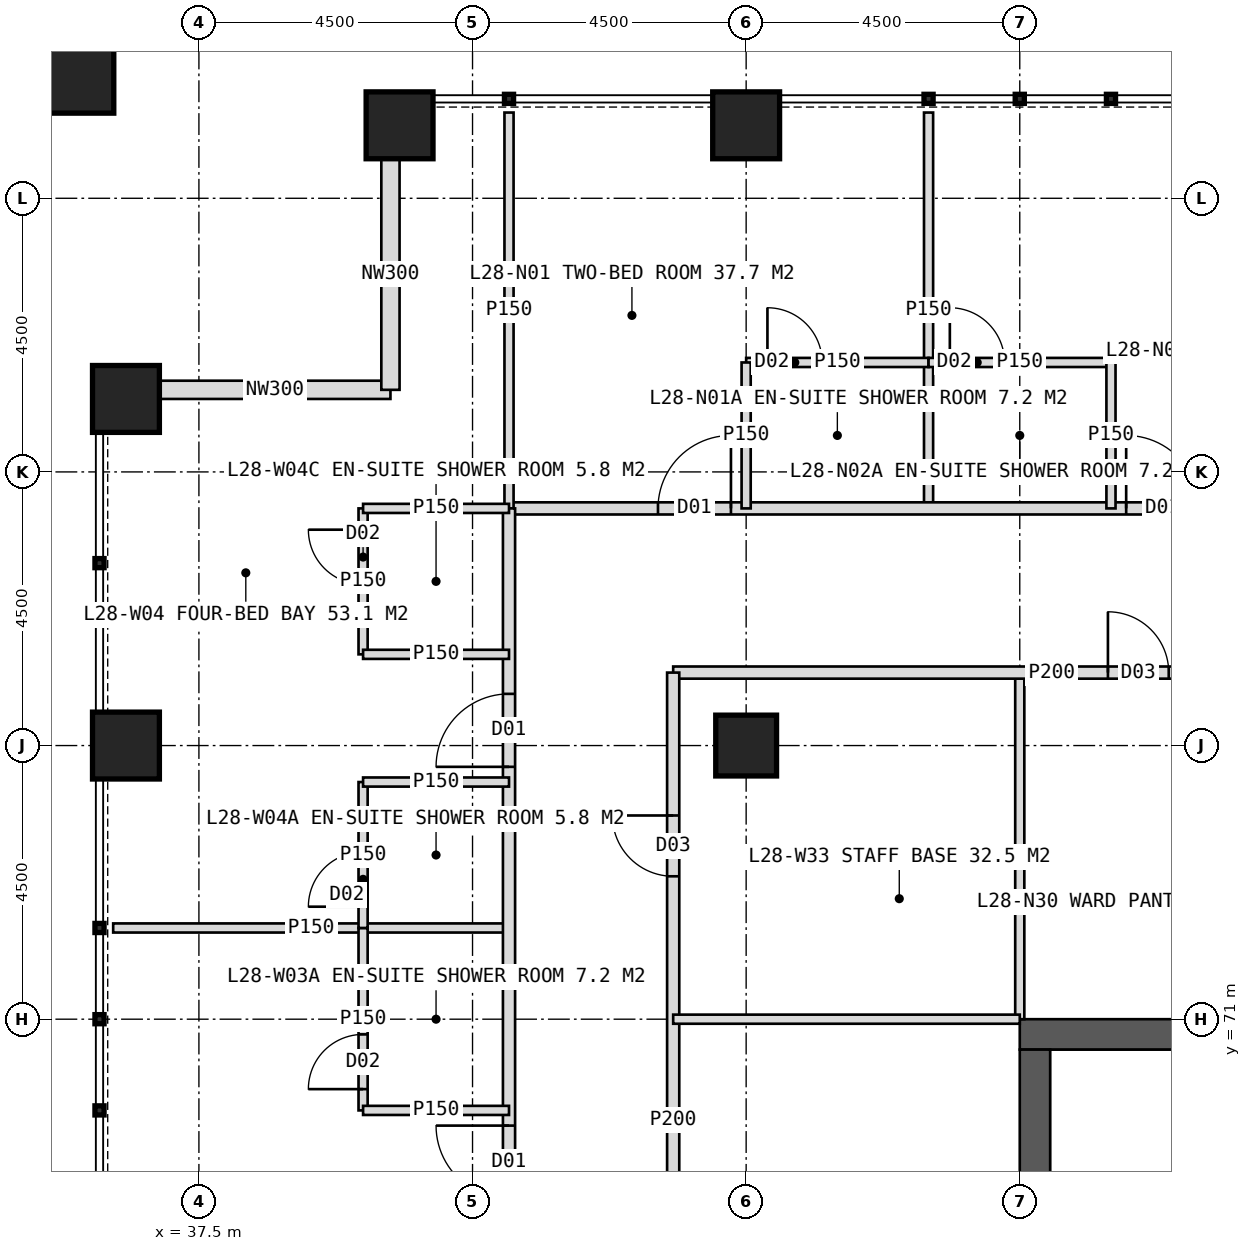
"""IFC4 building model, lengths in metres.
Left out: names, types, materials, properties, quantities, classifications, styles, units other than length and angle.
Written with IfcOpenShell. Run it as: python <this file> out.ifc"""

import sys

from ifc_helpers import new_model, si_unit, direction, frame, frame_2d, origin, origin_2d, place, context, subcontext, project, spatial, rectangle, hollow_rectangle, extrude, element, fill, save


model = new_model("IFC4")
c1 = context("Model", 3, precision=1e-05, world=origin(), true_north=direction((0.0, 1.0)))
c2 = subcontext(c1, "Body", "Model", "MODEL_VIEW")
j1 = project(units=[si_unit("LENGTHUNIT", "METRE"), si_unit("PLANEANGLEUNIT", "RADIAN")], contexts=[c1])
p1 = place(None, origin())
s1 = spatial("IfcSite", under=j1, at=p1, CompositionType="ELEMENT")
p2 = place(p1, origin())
s2 = spatial("IfcBuilding", under=s1, at=p2, CompositionType="ELEMENT")
p3 = place(p2, frame((0.0, 0.0, 120.0)))
s3 = spatial("IfcBuildingStorey", under=s2, at=p3, CompositionType="ELEMENT", Elevation=120.0)
p4 = place(p3, frame((51.0, 70.75, 0.0), z_axis=(0.0, 0.0, 1.0), x_axis=(1.0, 0.0, 0.0)))
e1 = element("IfcWall", 1, at=p4, inside=s3, PredefinedType="SHEAR", context=c2, shape_type="SweptSolid", body=[
    extrude(rectangle(XDim=18.0, YDim=0.5, at=frame_2d((9.0, 0.0))), origin(), (0.0, 0.0, 1.0), 4.0),
])
p5 = place(p4, frame((8.1, 0.0, 0.0)))
e2 = element("IfcOpeningElement", 2, at=p5, cuts=e1, PredefinedType="OPENING", context=c2, shape_type="SweptSolid", body=[
    extrude(rectangle(XDim=1.8, YDim=2.2, at=frame_2d((0.9, 1.1))), frame((0.0, 0.26, 0.0), z_axis=(0.0, -1.0, 0.0), x_axis=(1.0, 0.0, 0.0)), (0.0, 0.0, 1.0), 0.52),
])
p6 = place(p3, frame((51.25, 53.5, 0.0), z_axis=(0.0, 0.0, 1.0), x_axis=(0.0, 1.0, 0.0)))
e3 = element("IfcWall", 3, at=p6, inside=s3, PredefinedType="SHEAR", context=c2, shape_type="SweptSolid", body=[
    extrude(rectangle(XDim=17.0, YDim=0.5, at=frame_2d((8.5, 0.0))), origin(), (0.0, 0.0, 1.0), 4.0),
])
p7 = place(p6, frame((6.0, 0.0, 0.0)))
e4 = element("IfcOpeningElement", 4, at=p7, cuts=e3, PredefinedType="OPENING", context=c2, shape_type="SweptSolid", body=[
    extrude(rectangle(XDim=1.5, YDim=2.2, at=frame_2d((0.75, 1.1))), frame((0.0, 0.26, 0.0), z_axis=(0.0, -1.0, 0.0), x_axis=(1.0, 0.0, 0.0)), (0.0, 0.0, 1.0), 0.52),
])
p8 = place(p3, frame((46.5, 75.5, 0.0), z_axis=(0.0, 0.0, 1.0), x_axis=(1.0, 0.0, 0.0)))
e5 = element("IfcColumn", 5, at=p8, inside=s3, PredefinedType="COLUMN", context=c2, shape_type="SweptSolid", body=[
    extrude(hollow_rectangle(XDim=1.0, YDim=1.0, WallThickness=0.1, at=origin_2d()), origin(), (0.0, 0.0, 1.0), 4.0),
])
for number, where, z_axis, x_axis in (
    (6, (40.8, 85.7, 0.0), (0.0, 0.0, 1.0), (1.0, 0.0, 0.0)),
    (7, (46.5, 85.7, 0.0), (0.0, 0.0, 1.0), (1.0, 0.0, 0.0)),
    (8, (36.3, 75.5, 0.0), (0.0, 0.0, 1.0), (1.0, 0.0, 0.0)),
    (9, (36.3, 81.2, 0.0), (0.0, 0.0, 1.0), (1.0, 0.0, 0.0)),
):
    element("IfcColumn", number, at=place(p3, frame(where, z_axis=z_axis, x_axis=x_axis)), inside=s3, PredefinedType="COLUMN", context=c2, shape_type="SweptSolid", body=[
        extrude(hollow_rectangle(XDim=1.1, YDim=1.1, WallThickness=0.1, at=origin_2d()), origin(), (0.0, 0.0, 1.0), 4.0),
    ])
p9 = place(p3, frame((35.4, 86.6, 0.0), z_axis=(0.0, 0.0, 1.0), x_axis=(1.0, 0.0, 0.0)))
e10 = element("IfcColumn", 10, at=p9, inside=s3, PredefinedType="COLUMN", context=c2, shape_type="SweptSolid", body=[
    extrude(hollow_rectangle(XDim=1.4, YDim=1.4, WallThickness=0.08, at=origin_2d()), origin(), (0.0, 0.0, 1.0), 4.0),
])
for number, where, z_axis, x_axis in (
    (11, (36.85, 81.35, 0.0), (0.0, 0.0, 1.0), (1.0, 0.0, 0.0)),
    (12, (40.65, 81.35, 0.0), (0.0, 0.0, 1.0), (0.0, 1.0, 0.0)),
):
    element("IfcWall", number, at=place(p3, frame(where, z_axis=z_axis, x_axis=x_axis)), inside=s3, PredefinedType="ELEMENTEDWALL", context=c2, shape_type="SweptSolid", body=[
        extrude(rectangle(XDim=3.8, YDim=0.3, at=frame_2d((1.9, 0.0))), origin(), (0.0, 0.0, 1.0), 4.0),
    ])
p10 = place(p3, frame((49.5, 79.4, 0.0), z_axis=(0.0, 0.0, 1.0), x_axis=(0.0, 1.0, 0.0)))
e13 = element("IfcWall", 13, at=p10, inside=s3, PredefinedType="PARTITIONING", context=c2, shape_type="SweptSolid", body=[
    extrude(rectangle(XDim=6.51, YDim=0.15, at=frame_2d((3.255, 0.0))), origin(), (0.0, 0.0, 1.0), 3.75),
])
p11 = place(p3, frame((42.6, 79.4, 0.0), z_axis=(0.0, 0.0, 1.0), x_axis=(1.0, 0.0, 0.0)))
e14 = element("IfcWall", 14, at=p11, inside=s3, PredefinedType="PARTITIONING", context=c2, shape_type="SweptSolid", body=[
    extrude(rectangle(XDim=34.8, YDim=0.2, at=frame_2d((17.4, 0.0))), origin(), (0.0, 0.0, 1.0), 3.75),
])
p12 = place(p11, frame((2.45, 0.0, 0.0)))
e15 = element("IfcOpeningElement", 15, at=p12, cuts=e14, PredefinedType="OPENING", context=c2, shape_type="SweptSolid", body=[
    extrude(rectangle(XDim=1.2, YDim=2.2, at=frame_2d((0.6, 1.1))), frame((0.0, 0.11, 0.0), z_axis=(0.0, -1.0, 0.0), x_axis=(1.0, 0.0, 0.0)), (0.0, 0.0, 1.0), 0.22),
])
p13 = place(p11, frame((10.15, 0.0, 0.0)))
e16 = element("IfcOpeningElement", 16, at=p13, cuts=e14, PredefinedType="OPENING", context=c2, shape_type="SweptSolid", body=[
    extrude(rectangle(XDim=1.2, YDim=2.2, at=frame_2d((0.6, 1.1))), frame((0.0, 0.11, 0.0), z_axis=(0.0, -1.0, 0.0), x_axis=(1.0, 0.0, 0.0)), (0.0, 0.0, 1.0), 0.22),
])
p14 = place(p11, frame((19.8, 0.0, 0.0)))
e17 = element("IfcOpeningElement", 17, at=p14, cuts=e14, PredefinedType="OPENING", context=c2, shape_type="SweptSolid", body=[
    extrude(rectangle(XDim=1.2, YDim=2.2, at=frame_2d((0.6, 1.1))), frame((0.0, 0.11, 0.0), z_axis=(0.0, -1.0, 0.0), x_axis=(1.0, 0.0, 0.0)), (0.0, 0.0, 1.0), 0.22),
])
p15 = place(p11, frame((27.55, 0.0, 0.0)))
e18 = element("IfcOpeningElement", 18, at=p15, cuts=e14, PredefinedType="OPENING", context=c2, shape_type="SweptSolid", body=[
    extrude(rectangle(XDim=1.2, YDim=2.2, at=frame_2d((0.6, 1.1))), frame((0.0, 0.11, 0.0), z_axis=(0.0, -1.0, 0.0), x_axis=(1.0, 0.0, 0.0)), (0.0, 0.0, 1.0), 0.22),
])
p16 = place(p3, frame((42.6, 79.4, 0.0), z_axis=(0.0, 0.0, 1.0), x_axis=(0.0, 1.0, 0.0)))
e19 = element("IfcWall", 19, at=p16, inside=s3, PredefinedType="PARTITIONING", context=c2, shape_type="SweptSolid", body=[
    extrude(rectangle(XDim=6.51, YDim=0.15, at=frame_2d((3.255, 0.0))), origin(), (0.0, 0.0, 1.0), 3.75),
])
p17 = place(p3, frame((46.5, 81.8, 0.0), z_axis=(0.0, 0.0, 1.0), x_axis=(1.0, 0.0, 0.0)))
e20 = element("IfcWall", 20, at=p17, inside=s3, PredefinedType="PARTITIONING", context=c2, shape_type="SweptSolid", body=[
    extrude(rectangle(XDim=3.0, YDim=0.15, at=frame_2d((1.5, 0.0))), origin(), (0.0, 0.0, 1.0), 3.75),
])
p18 = place(p17, frame((0.35, 0.0, 0.0)))
e21 = element("IfcOpeningElement", 21, at=p18, cuts=e20, PredefinedType="OPENING", context=c2, shape_type="SweptSolid", body=[
    extrude(rectangle(XDim=0.9, YDim=2.1, at=frame_2d((0.45, 1.05))), frame((0.0, 0.085, 0.0), z_axis=(0.0, -1.0, 0.0), x_axis=(1.0, 0.0, 0.0)), (0.0, 0.0, 1.0), 0.17),
])
p19 = place(p3, frame((46.5, 79.4, 0.0), z_axis=(0.0, 0.0, 1.0), x_axis=(0.0, 1.0, 0.0)))
e22 = element("IfcWall", 22, at=p19, inside=s3, PredefinedType="PARTITIONING", context=c2, shape_type="SweptSolid", body=[
    extrude(rectangle(XDim=2.4, YDim=0.15, at=frame_2d((1.2, 0.0))), origin(), (0.0, 0.0, 1.0), 2.95),
])
p20 = place(p3, frame((49.5, 81.8, 0.0), z_axis=(0.0, 0.0, 1.0), x_axis=(1.0, 0.0, 0.0)))
e23 = element("IfcWall", 23, at=p20, inside=s3, PredefinedType="PARTITIONING", context=c2, shape_type="SweptSolid", body=[
    extrude(rectangle(XDim=3.0, YDim=0.15, at=frame_2d((1.5, 0.0))), origin(), (0.0, 0.0, 1.0), 3.75),
])
p21 = place(p20, frame((0.35, 0.0, 0.0)))
e24 = element("IfcOpeningElement", 24, at=p21, cuts=e23, PredefinedType="OPENING", context=c2, shape_type="SweptSolid", body=[
    extrude(rectangle(XDim=0.9, YDim=2.1, at=frame_2d((0.45, 1.05))), frame((0.0, 0.085, 0.0), z_axis=(0.0, -1.0, 0.0), x_axis=(1.0, 0.0, 0.0)), (0.0, 0.0, 1.0), 0.17),
])
p22 = place(p3, frame((52.5, 79.4, 0.0), z_axis=(0.0, 0.0, 1.0), x_axis=(0.0, 1.0, 0.0)))
e25 = element("IfcWall", 25, at=p22, inside=s3, PredefinedType="PARTITIONING", context=c2, shape_type="SweptSolid", body=[
    extrude(rectangle(XDim=2.4, YDim=0.15, at=frame_2d((1.2, 0.0))), origin(), (0.0, 0.0, 1.0), 3.75),
])
p23 = place(p3, frame((51.0, 71.0, 0.0), z_axis=(0.0, 0.0, 1.0), x_axis=(0.0, 1.0, 0.0)))
e26 = element("IfcWall", 26, at=p23, inside=s3, PredefinedType="PARTITIONING", context=c2, shape_type="SweptSolid", body=[
    extrude(rectangle(XDim=5.7, YDim=0.15, at=frame_2d((2.85, 0.0))), origin(), (0.0, 0.0, 1.0), 3.75),
])
p24 = place(p3, frame((45.3, 76.7, 0.0), z_axis=(0.0, 0.0, 1.0), x_axis=(1.0, 0.0, 0.0)))
e27 = element("IfcWall", 27, at=p24, inside=s3, PredefinedType="PARTITIONING", context=c2, shape_type="SweptSolid", body=[
    extrude(rectangle(XDim=12.45, YDim=0.2, at=frame_2d((6.225, 0.0))), origin(), (0.0, 0.0, 1.0), 3.75),
])
p25 = place(p24, frame((7.15, 0.0, 0.0)))
e28 = element("IfcOpeningElement", 28, at=p25, cuts=e27, PredefinedType="OPENING", context=c2, shape_type="SweptSolid", body=[
    extrude(rectangle(XDim=1.0, YDim=2.1, at=frame_2d((0.5, 1.05))), frame((0.0, 0.11, 0.0), z_axis=(0.0, -1.0, 0.0), x_axis=(1.0, 0.0, 0.0)), (0.0, 0.0, 1.0), 0.22),
])
p26 = place(p3, frame((42.6, 72.5, 0.0), z_axis=(0.0, 0.0, 1.0), x_axis=(-1.0, 0.0, 0.0)))
e29 = element("IfcWall", 29, at=p26, inside=s3, PredefinedType="PARTITIONING", context=c2, shape_type="SweptSolid", body=[
    extrude(rectangle(XDim=6.51, YDim=0.15, at=frame_2d((3.255, 0.0))), origin(), (0.0, 0.0, 1.0), 3.75),
])
p27 = place(p3, frame((42.6, 44.6, 0.0), z_axis=(0.0, 0.0, 1.0), x_axis=(0.0, 1.0, 0.0)))
e30 = element("IfcWall", 30, at=p27, inside=s3, PredefinedType="PARTITIONING", context=c2, shape_type="SweptSolid", body=[
    extrude(rectangle(XDim=34.8, YDim=0.2, at=frame_2d((17.4, 0.0))), origin(), (0.0, 0.0, 1.0), 3.75),
])
p28 = place(p27, frame((2.45, 0.0, 0.0)))
e31 = element("IfcOpeningElement", 31, at=p28, cuts=e30, PredefinedType="OPENING", context=c2, shape_type="SweptSolid", body=[
    extrude(rectangle(XDim=1.2, YDim=2.2, at=frame_2d((0.6, 1.1))), frame((0.0, 0.11, 0.0), z_axis=(0.0, -1.0, 0.0), x_axis=(1.0, 0.0, 0.0)), (0.0, 0.0, 1.0), 0.22),
])
p29 = place(p27, frame((10.15, 0.0, 0.0)))
e32 = element("IfcOpeningElement", 32, at=p29, cuts=e30, PredefinedType="OPENING", context=c2, shape_type="SweptSolid", body=[
    extrude(rectangle(XDim=1.2, YDim=2.2, at=frame_2d((0.6, 1.1))), frame((0.0, 0.11, 0.0), z_axis=(0.0, -1.0, 0.0), x_axis=(1.0, 0.0, 0.0)), (0.0, 0.0, 1.0), 0.22),
])
p30 = place(p27, frame((23.45, 0.0, 0.0)))
e33 = element("IfcOpeningElement", 33, at=p30, cuts=e30, PredefinedType="OPENING", context=c2, shape_type="SweptSolid", body=[
    extrude(rectangle(XDim=1.2, YDim=2.2, at=frame_2d((0.6, 1.1))), frame((0.0, 0.11, 0.0), z_axis=(0.0, -1.0, 0.0), x_axis=(1.0, 0.0, 0.0)), (0.0, 0.0, 1.0), 0.22),
])
p31 = place(p27, frame((30.55, 0.0, 0.0)))
e34 = element("IfcOpeningElement", 34, at=p31, cuts=e30, PredefinedType="OPENING", context=c2, shape_type="SweptSolid", body=[
    extrude(rectangle(XDim=1.2, YDim=2.2, at=frame_2d((0.6, 1.1))), frame((0.0, 0.11, 0.0), z_axis=(0.0, -1.0, 0.0), x_axis=(1.0, 0.0, 0.0)), (0.0, 0.0, 1.0), 0.22),
])
p32 = place(p3, frame((40.2, 69.5, 0.0), z_axis=(0.0, 0.0, 1.0), x_axis=(0.0, 1.0, 0.0)))
e35 = element("IfcWall", 35, at=p32, inside=s3, PredefinedType="PARTITIONING", context=c2, shape_type="SweptSolid", body=[
    extrude(rectangle(XDim=3.0, YDim=0.15, at=frame_2d((1.5, 0.0))), origin(), (0.0, 0.0, 1.0), 3.75),
])
p33 = place(p32, frame((0.35, 0.0, 0.0)))
e36 = element("IfcOpeningElement", 36, at=p33, cuts=e35, PredefinedType="OPENING", context=c2, shape_type="SweptSolid", body=[
    extrude(rectangle(XDim=0.9, YDim=2.1, at=frame_2d((0.45, 1.05))), frame((0.0, 0.085, 0.0), z_axis=(0.0, -1.0, 0.0), x_axis=(1.0, 0.0, 0.0)), (0.0, 0.0, 1.0), 0.17),
])
p34 = place(p3, frame((42.6, 69.5, 0.0), z_axis=(0.0, 0.0, 1.0), x_axis=(-1.0, 0.0, 0.0)))
e37 = element("IfcWall", 37, at=p34, inside=s3, PredefinedType="PARTITIONING", context=c2, shape_type="SweptSolid", body=[
    extrude(rectangle(XDim=2.4, YDim=0.15, at=frame_2d((1.2, 0.0))), origin(), (0.0, 0.0, 1.0), 3.75),
])
p35 = place(p3, frame((40.2, 72.5, 0.0), z_axis=(0.0, 0.0, 1.0), x_axis=(0.0, 1.0, 0.0)))
e38 = element("IfcWall", 38, at=p35, inside=s3, PredefinedType="PARTITIONING", context=c2, shape_type="SweptSolid", body=[
    extrude(rectangle(XDim=2.4, YDim=0.15, at=frame_2d((1.2, 0.0))), origin(), (0.0, 0.0, 1.0), 3.75),
])
p36 = place(p35, frame((0.35, 0.0, 0.0)))
e39 = element("IfcOpeningElement", 39, at=p36, cuts=e38, PredefinedType="OPENING", context=c2, shape_type="SweptSolid", body=[
    extrude(rectangle(XDim=0.9, YDim=2.1, at=frame_2d((0.45, 1.05))), frame((0.0, 0.085, 0.0), z_axis=(0.0, -1.0, 0.0), x_axis=(1.0, 0.0, 0.0)), (0.0, 0.0, 1.0), 0.17),
])
p37 = place(p3, frame((42.6, 74.9, 0.0), z_axis=(0.0, 0.0, 1.0), x_axis=(-1.0, 0.0, 0.0)))
e40 = element("IfcWall", 40, at=p37, inside=s3, PredefinedType="PARTITIONING", context=c2, shape_type="SweptSolid", body=[
    extrude(rectangle(XDim=2.4, YDim=0.15, at=frame_2d((1.2, 0.0))), origin(), (0.0, 0.0, 1.0), 3.75),
])
p38 = place(p3, frame((40.2, 77.0, 0.0), z_axis=(0.0, 0.0, 1.0), x_axis=(0.0, 1.0, 0.0)))
e41 = element("IfcWall", 41, at=p38, inside=s3, PredefinedType="PARTITIONING", context=c2, shape_type="SweptSolid", body=[
    extrude(rectangle(XDim=2.4, YDim=0.15, at=frame_2d((1.2, 0.0))), origin(), (0.0, 0.0, 1.0), 3.75),
])
p39 = place(p38, frame((1.15, 0.0, 0.0)))
e42 = element("IfcOpeningElement", 42, at=p39, cuts=e41, PredefinedType="OPENING", context=c2, shape_type="SweptSolid", body=[
    extrude(rectangle(XDim=0.9, YDim=2.1, at=frame_2d((0.45, 1.05))), frame((0.0, 0.085, 0.0), z_axis=(0.0, -1.0, 0.0), x_axis=(1.0, 0.0, 0.0)), (0.0, 0.0, 1.0), 0.17),
])
for number, where, z_axis, x_axis in (
    (43, (42.6, 77.0, 0.0), (0.0, 0.0, 1.0), (-1.0, 0.0, 0.0)),
    (44, (42.6, 79.4, 0.0), (0.0, 0.0, 1.0), (-1.0, 0.0, 0.0)),
):
    element("IfcWall", number, at=place(p3, frame(where, z_axis=z_axis, x_axis=x_axis)), inside=s3, PredefinedType="PARTITIONING", context=c2, shape_type="SweptSolid", body=[
        extrude(rectangle(XDim=2.4, YDim=0.15, at=frame_2d((1.2, 0.0))), origin(), (0.0, 0.0, 1.0), 3.75),
    ])
p40 = place(p3, frame((45.3, 62.0, 0.0), z_axis=(0.0, 0.0, 1.0), x_axis=(0.0, 1.0, 0.0)))
e45 = element("IfcWall", 45, at=p40, inside=s3, PredefinedType="PARTITIONING", context=c2, shape_type="SweptSolid", body=[
    extrude(rectangle(XDim=14.7, YDim=0.2, at=frame_2d((7.35, 0.0))), origin(), (0.0, 0.0, 1.0), 3.75),
])
p41 = place(p40, frame((1.45, 0.0, 0.0)))
e46 = element("IfcOpeningElement", 46, at=p41, cuts=e45, PredefinedType="OPENING", context=c2, shape_type="SweptSolid", body=[
    extrude(rectangle(XDim=1.0, YDim=2.1, at=frame_2d((0.5, 1.05))), frame((0.0, 0.11, 0.0), z_axis=(0.0, -1.0, 0.0), x_axis=(1.0, 0.0, 0.0)), (0.0, 0.0, 1.0), 0.22),
])
p42 = place(p40, frame((11.35, 0.0, 0.0)))
e47 = element("IfcOpeningElement", 47, at=p42, cuts=e45, PredefinedType="OPENING", context=c2, shape_type="SweptSolid", body=[
    extrude(rectangle(XDim=1.0, YDim=2.1, at=frame_2d((0.5, 1.05))), frame((0.0, 0.11, 0.0), z_axis=(0.0, -1.0, 0.0), x_axis=(1.0, 0.0, 0.0)), (0.0, 0.0, 1.0), 0.22),
])
p43 = place(p3, frame((51.0, 71.0, 0.0), z_axis=(0.0, 0.0, 1.0), x_axis=(-1.0, 0.0, 0.0)))
e48 = element("IfcWall", 48, at=p43, inside=s3, PredefinedType="PARTITIONING", context=c2, shape_type="SweptSolid", body=[
    extrude(rectangle(XDim=5.7, YDim=0.15, at=frame_2d((2.85, 0.0))), origin(), (0.0, 0.0, 1.0), 3.75),
])
p44 = place(p12, origin())
e49 = element("IfcDoor", 49, at=p44, inside=s3, OperationType="SINGLE_SWING_RIGHT", PredefinedType="DOOR", context=c2, shape_type="SweptSolid", body=[
    extrude(rectangle(XDim=1.2, YDim=2.2, at=frame_2d((0.6, 1.1))), frame((0.0, 0.025, 0.0), z_axis=(0.0, -1.0, 0.0), x_axis=(1.0, 0.0, 0.0)), (0.0, 0.0, 1.0), 0.05),
])
fill(e15, e49)
p45 = place(p18, origin())
e50 = element("IfcDoor", 50, at=p45, inside=s3, OperationType="SINGLE_SWING_LEFT", PredefinedType="DOOR", context=c2, shape_type="SweptSolid", body=[
    extrude(rectangle(XDim=0.9, YDim=2.1, at=frame_2d((0.45, 1.05))), frame((0.0, 0.025, 0.0), z_axis=(0.0, -1.0, 0.0), x_axis=(1.0, 0.0, 0.0)), (0.0, 0.0, 1.0), 0.05),
])
fill(e21, e50)
p46 = place(p13, origin())
e51 = element("IfcDoor", 51, at=p46, inside=s3, OperationType="SINGLE_SWING_LEFT", PredefinedType="DOOR", context=c2, shape_type="SweptSolid", body=[
    extrude(rectangle(XDim=1.2, YDim=2.2, at=frame_2d((0.6, 1.1))), frame((0.0, 0.025, 0.0), z_axis=(0.0, -1.0, 0.0), x_axis=(1.0, 0.0, 0.0)), (0.0, 0.0, 1.0), 0.05),
])
fill(e16, e51)
p47 = place(p21, origin())
e52 = element("IfcDoor", 52, at=p47, inside=s3, OperationType="SINGLE_SWING_LEFT", PredefinedType="DOOR", context=c2, shape_type="SweptSolid", body=[
    extrude(rectangle(XDim=0.9, YDim=2.1, at=frame_2d((0.45, 1.05))), frame((0.0, 0.025, 0.0), z_axis=(0.0, -1.0, 0.0), x_axis=(1.0, 0.0, 0.0)), (0.0, 0.0, 1.0), 0.05),
])
fill(e24, e52)
p48 = place(p25, origin())
e53 = element("IfcDoor", 53, at=p48, inside=s3, OperationType="SINGLE_SWING_LEFT", PredefinedType="DOOR", context=c2, shape_type="SweptSolid", body=[
    extrude(rectangle(XDim=1.0, YDim=2.1, at=frame_2d((0.5, 1.05))), frame((0.0, 0.025, 0.0), z_axis=(0.0, -1.0, 0.0), x_axis=(1.0, 0.0, 0.0)), (0.0, 0.0, 1.0), 0.05),
])
fill(e28, e53)
p49 = place(p30, origin())
e54 = element("IfcDoor", 54, at=p49, inside=s3, OperationType="SINGLE_SWING_RIGHT", PredefinedType="DOOR", context=c2, shape_type="SweptSolid", body=[
    extrude(rectangle(XDim=1.2, YDim=2.2, at=frame_2d((0.6, 1.1))), frame((0.0, 0.025, 0.0), z_axis=(0.0, -1.0, 0.0), x_axis=(1.0, 0.0, 0.0)), (0.0, 0.0, 1.0), 0.05),
])
fill(e33, e54)
p50 = place(p33, origin())
e55 = element("IfcDoor", 55, at=p50, inside=s3, OperationType="SINGLE_SWING_LEFT", PredefinedType="DOOR", context=c2, shape_type="SweptSolid", body=[
    extrude(rectangle(XDim=0.9, YDim=2.1, at=frame_2d((0.45, 1.05))), frame((0.0, 0.025, 0.0), z_axis=(0.0, -1.0, 0.0), x_axis=(1.0, 0.0, 0.0)), (0.0, 0.0, 1.0), 0.05),
])
fill(e36, e55)
p51 = place(p31, origin())
e56 = element("IfcDoor", 56, at=p51, inside=s3, OperationType="SINGLE_SWING_LEFT", PredefinedType="DOOR", context=c2, shape_type="SweptSolid", body=[
    extrude(rectangle(XDim=1.2, YDim=2.2, at=frame_2d((0.6, 1.1))), frame((0.0, 0.025, 0.0), z_axis=(0.0, -1.0, 0.0), x_axis=(1.0, 0.0, 0.0)), (0.0, 0.0, 1.0), 0.05),
])
fill(e34, e56)
p52 = place(p36, origin())
e57 = element("IfcDoor", 57, at=p52, inside=s3, OperationType="SINGLE_SWING_LEFT", PredefinedType="DOOR", context=c2, shape_type="SweptSolid", body=[
    extrude(rectangle(XDim=0.9, YDim=2.1, at=frame_2d((0.45, 1.05))), frame((0.0, 0.025, 0.0), z_axis=(0.0, -1.0, 0.0), x_axis=(1.0, 0.0, 0.0)), (0.0, 0.0, 1.0), 0.05),
])
fill(e39, e57)
p53 = place(p39, origin())
e58 = element("IfcDoor", 58, at=p53, inside=s3, OperationType="SINGLE_SWING_RIGHT", PredefinedType="DOOR", context=c2, shape_type="SweptSolid", body=[
    extrude(rectangle(XDim=0.9, YDim=2.1, at=frame_2d((0.45, 1.05))), frame((0.0, 0.025, 0.0), z_axis=(0.0, -1.0, 0.0), x_axis=(1.0, 0.0, 0.0)), (0.0, 0.0, 1.0), 0.05),
])
fill(e42, e58)
p54 = place(p42, origin())
e59 = element("IfcDoor", 59, at=p54, inside=s3, OperationType="SINGLE_SWING_RIGHT", PredefinedType="DOOR", context=c2, shape_type="SweptSolid", body=[
    extrude(rectangle(XDim=1.0, YDim=2.1, at=frame_2d((0.5, 1.05))), frame((0.0, 0.025, 0.0), z_axis=(0.0, -1.0, 0.0), x_axis=(1.0, 0.0, 0.0)), (0.0, 0.0, 1.0), 0.05),
])
fill(e47, e59)
save(model, sys.argv[1])
